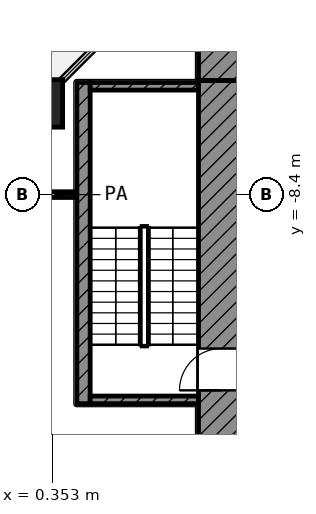
"""IFC4 building model, lengths in metres.
Left out: names, types, materials, properties, quantities, classifications, styles, units other than length and angle.
Written with IfcOpenShell. Run it as: python <this file> out.ifc"""

import sys

from ifc_helpers import new_model, si_unit, direction, frame, frame_2d, origin, origin_2d, place, context, subcontext, project, spatial, rectangle, extrude, element, fill, save


model = new_model("IFC4")
c1 = context("Model", 3, precision=1e-05, world=origin(), true_north=direction((0.0, 1.0)))
c2 = subcontext(c1, "Body", "Model", "MODEL_VIEW")
j1 = project(units=[si_unit("LENGTHUNIT", "METRE"), si_unit("PLANEANGLEUNIT", "RADIAN")], contexts=[c1])
p1 = place(None, origin())
s1 = spatial("IfcSite", under=j1, at=p1, CompositionType="ELEMENT")
p2 = place(p1, origin())
s2 = spatial("IfcBuilding", under=s1, at=p2, CompositionType="ELEMENT")
p3 = place(p2, frame((0.0, 0.0, 81.2)))
s3 = spatial("IfcBuildingStorey", under=s2, at=p3, CompositionType="ELEMENT", Elevation=81.2)
p4 = place(p3, frame((0.0, -6.0, 0.0), z_axis=(0.0, 0.0, 1.0), x_axis=(1.0, 0.0, 0.0)))
e1 = element("IfcColumn", 1, at=p4, inside=s3, PredefinedType="COLUMN", context=c2, shape_type="SweptSolid", body=[
    extrude(rectangle(XDim=1.25, YDim=1.25, at=origin_2d()), origin(), (0.0, 0.0, 1.0), 4.2),
])
p5 = place(p3, frame((4.2, -4.8, 0.0), z_axis=(0.0, 0.0, 1.0), x_axis=(1.0, 0.0, 0.0)))
e2 = element("IfcWall", 2, at=p5, inside=s3, PredefinedType="SHEAR", context=c2, shape_type="SweptSolid", body=[
    extrude(rectangle(XDim=20.9, YDim=1.2, at=frame_2d((10.45, 0.0))), origin(), (0.0, 0.0, 1.0), 3.9),
])
p6 = place(p5, frame((1.95, 0.0, 0.0)))
e3 = element("IfcOpeningElement", 3, at=p6, cuts=e2, PredefinedType="OPENING", context=c2, shape_type="SweptSolid", body=[
    extrude(rectangle(XDim=1.1, YDim=2.1, at=frame_2d((0.55, 1.05))), frame((0.0, 0.61, 0.0), z_axis=(0.0, -1.0, 0.0), x_axis=(1.0, 0.0, 0.0)), (0.0, 0.0, 1.0), 1.22),
])
p7 = place(p5, frame((17.95, 0.0, 0.0)))
e4 = element("IfcOpeningElement", 4, at=p7, cuts=e2, PredefinedType="OPENING", context=c2, shape_type="SweptSolid", body=[
    extrude(rectangle(XDim=1.1, YDim=2.1, at=frame_2d((0.55, 1.05))), frame((0.0, 0.61, 0.0), z_axis=(0.0, -1.0, 0.0), x_axis=(1.0, 0.0, 0.0)), (0.0, 0.0, 1.0), 1.22),
])
p8 = place(p3, frame((4.8, -25.1, 0.0), z_axis=(0.0, 0.0, 1.0), x_axis=(0.0, 1.0, 0.0)))
e5 = element("IfcWall", 5, at=p8, inside=s3, PredefinedType="SHEAR", context=c2, shape_type="SweptSolid", body=[
    extrude(rectangle(XDim=19.7, YDim=1.2, at=frame_2d((9.85, 0.0))), origin(), (0.0, 0.0, 1.0), 3.9),
])
p9 = place(p8, frame((11.55, 0.0, 0.0)))
e6 = element("IfcOpeningElement", 6, at=p9, cuts=e5, PredefinedType="OPENING", context=c2, shape_type="SweptSolid", body=[
    extrude(rectangle(XDim=1.1, YDim=2.1, at=frame_2d((0.55, 1.05))), frame((0.0, 0.61, 0.0), z_axis=(0.0, -1.0, 0.0), x_axis=(1.0, 0.0, 0.0)), (0.0, 0.0, 1.0), 1.22),
])
p10 = place(p8, frame((2.25, 0.0, 0.0)))
e7 = element("IfcOpeningElement", 7, at=p10, cuts=e5, PredefinedType="OPENING", context=c2, shape_type="SweptSolid", body=[
    extrude(rectangle(XDim=1.1, YDim=2.1, at=frame_2d((0.55, 1.05))), frame((0.0, 0.61, 0.0), z_axis=(0.0, -1.0, 0.0), x_axis=(1.0, 0.0, 0.0)), (0.0, 0.0, 1.0), 1.22),
])
p11 = place(p3, frame((1.175, -13.9, 0.0), z_axis=(0.0, 0.0, 1.0), x_axis=(0.0, 1.0, 0.0)))
e8 = element("IfcWall", 8, at=p11, inside=s3, PredefinedType="SHEAR", context=c2, shape_type="SweptSolid", body=[
    extrude(rectangle(XDim=8.45, YDim=0.35, at=frame_2d((4.225, 0.0))), origin(), (0.0, 0.0, 1.0), 3.9),
])
for number, where, z_axis, x_axis in (
    (9, (1.35, -5.55, 0.0), (0.0, 0.0, 1.0), (1.0, 0.0, 0.0)),
    (10, (1.35, -13.8, 0.0), (0.0, 0.0, 1.0), (1.0, 0.0, 0.0)),
):
    element("IfcWall", number, at=place(p3, frame(where, z_axis=z_axis, x_axis=x_axis)), inside=s3, PredefinedType="SHEAR", context=c2, shape_type="SweptSolid", body=[
        extrude(rectangle(XDim=2.85, YDim=0.2, at=frame_2d((1.425, 0.0))), origin(), (0.0, 0.0, 1.0), 3.9),
    ])
p12 = place(p3, frame((0.08, -8.4, 0.0), z_axis=(0.0, 0.0, 1.0), x_axis=(1.0, 0.0, 0.0)))
e11 = element("IfcWall", 11, at=p12, inside=s3, PredefinedType="PARTITIONING", context=c2, shape_type="SweptSolid", body=[
    extrude(rectangle(XDim=0.89, YDim=0.15, at=frame_2d((0.445, 0.0))), origin(), (0.0, 0.0, 1.0), 3.9),
])
p13 = place(p9, origin())
e12 = element("IfcDoor", 12, at=p13, inside=s3, OperationType="SINGLE_SWING_LEFT", PredefinedType="DOOR", context=c2, shape_type="SweptSolid", body=[
    extrude(rectangle(XDim=1.1, YDim=2.1, at=frame_2d((0.55, 1.05))), frame((0.0, 0.025, 0.0), z_axis=(0.0, -1.0, 0.0), x_axis=(1.0, 0.0, 0.0)), (0.0, 0.0, 1.0), 0.05),
])
fill(e6, e12)
save(model, sys.argv[1])
